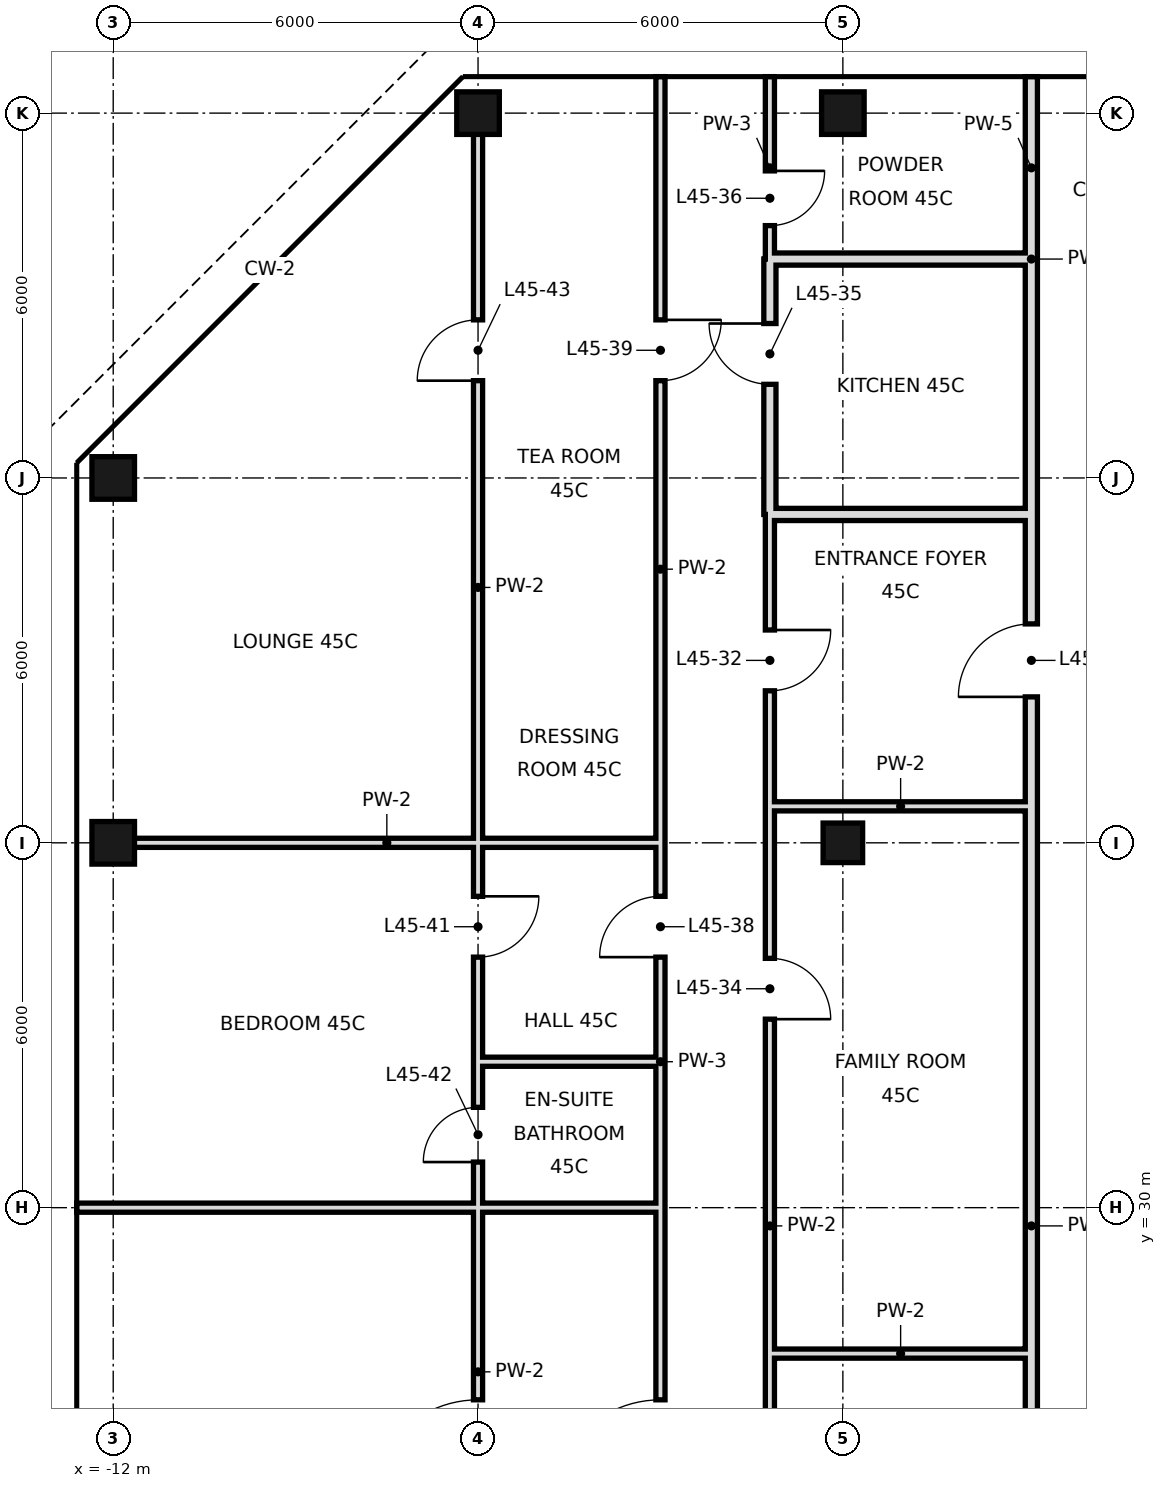
"""IFC4 building model, lengths in metres.
Left out: names, types, materials, properties, quantities, classifications, styles, units other than length and angle.
Written with IfcOpenShell. Run it as: python <this file> out.ifc"""

import sys

from ifc_helpers import new_model, si_unit, direction, frame, frame_2d, origin, origin_2d, place, context, subcontext, project, spatial, rectangle, hollow_rectangle, extrude, element, fill, save


model = new_model("IFC4")
c1 = context("Model", 3, precision=1e-05, world=origin(), true_north=direction((0.0, 1.0)))
c2 = subcontext(c1, "Body", "Model", "MODEL_VIEW")
j1 = project(units=[si_unit("LENGTHUNIT", "METRE"), si_unit("PLANEANGLEUNIT", "RADIAN")], contexts=[c1])
p1 = place(None, origin())
s1 = spatial("IfcSite", under=j1, at=p1, CompositionType="ELEMENT")
p2 = place(p1, origin())
s2 = spatial("IfcBuilding", under=s1, at=p2, CompositionType="ELEMENT")
p3 = place(p2, frame((0.0, 0.0, 195.6)))
s3 = spatial("IfcBuildingStorey", under=s2, at=p3, CompositionType="ELEMENT", Elevation=195.6)
for number, where, z_axis, x_axis in (
    (1, (-12.0, 36.0, 0.0), (0.0, 0.0, 1.0), (1.0, 0.0, 0.0)),
    (2, (-12.0, 42.0, 0.0), (0.0, 0.0, 1.0), (1.0, 0.0, 0.0)),
    (3, (-6.0, 48.0, 0.0), (0.0, 0.0, 1.0), (1.0, 0.0, 0.0)),
):
    element("IfcColumn", number, at=place(p3, frame(where, z_axis=z_axis, x_axis=x_axis)), inside=s3, PredefinedType="COLUMN", context=c2, shape_type="SweptSolid", body=[
        extrude(hollow_rectangle(XDim=0.7, YDim=0.7, WallThickness=0.036, at=origin_2d()), origin(), (0.0, 0.0, 1.0), 3.6),
    ])
p4 = place(p3, frame((0.0, 36.0, 0.0), z_axis=(0.0, 0.0, 1.0), x_axis=(1.0, 0.0, 0.0)))
e4 = element("IfcColumn", 4, at=p4, inside=s3, PredefinedType="COLUMN", context=c2, shape_type="SweptSolid", body=[
    extrude(hollow_rectangle(XDim=0.65, YDim=0.65, WallThickness=0.032, at=origin_2d()), origin(), (0.0, 0.0, 1.0), 3.6),
])
p5 = place(p3, frame((0.0, 48.0, 0.0), z_axis=(0.0, 0.0, 1.0), x_axis=(1.0, 0.0, 0.0)))
e5 = element("IfcColumn", 5, at=p5, inside=s3, PredefinedType="COLUMN", context=c2, shape_type="SweptSolid", body=[
    extrude(hollow_rectangle(XDim=0.7, YDim=0.7, WallThickness=0.036, at=origin_2d()), origin(), (0.0, 0.0, 1.0), 3.6),
])
p6 = place(p3, frame((-1.2, 41.4, 0.0), z_axis=(0.0, 0.0, 1.0), x_axis=(0.0, 1.0, 0.0)))
e6 = element("IfcWall", 6, at=p6, inside=s3, PredefinedType="SOLIDWALL", context=c2, shape_type="SweptSolid", body=[
    extrude(rectangle(XDim=4.2, YDim=0.2, at=frame_2d((2.1, 0.0))), origin(), (0.0, 0.0, 1.0), 2.72),
])
p7 = place(p6, frame((2.14, 0.0, 0.0)))
e7 = element("IfcOpeningElement", 7, at=p7, cuts=e6, PredefinedType="OPENING", context=c2, shape_type="SweptSolid", body=[
    extrude(rectangle(XDim=1.0, YDim=2.4, at=frame_2d((0.5, 1.2))), frame((0.0, 0.11, 0.0), z_axis=(0.0, -1.0, 0.0), x_axis=(1.0, 0.0, 0.0)), (0.0, 0.0, 1.0), 0.22),
])
p8 = place(p3, frame((-1.2, 18.0, 0.0), z_axis=(0.0, 0.0, 1.0), x_axis=(0.0, 1.0, 0.0)))
e8 = element("IfcWall", 8, at=p8, inside=s3, PredefinedType="PARTITIONING", context=c2, shape_type="SweptSolid", body=[
    extrude(rectangle(XDim=23.4, YDim=0.15, at=frame_2d((11.7, 0.0))), origin(), (0.0, 0.0, 1.0), 3.42),
])
p9 = place(p8, frame((20.5, 0.0, 0.0)))
e9 = element("IfcOpeningElement", 9, at=p9, cuts=e8, PredefinedType="OPENING", context=c2, shape_type="SweptSolid", body=[
    extrude(rectangle(XDim=1.0, YDim=2.4, at=frame_2d((0.5, 1.2))), frame((0.0, 0.085, 0.0), z_axis=(0.0, -1.0, 0.0), x_axis=(1.0, 0.0, 0.0)), (0.0, 0.0, 1.0), 0.17),
])
p10 = place(p8, frame((4.3, 0.0, 0.0)))
e10 = element("IfcOpeningElement", 10, at=p10, cuts=e8, PredefinedType="OPENING", context=c2, shape_type="SweptSolid", body=[
    extrude(rectangle(XDim=1.0, YDim=2.4, at=frame_2d((0.5, 1.2))), frame((0.0, 0.085, 0.0), z_axis=(0.0, -1.0, 0.0), x_axis=(1.0, 0.0, 0.0)), (0.0, 0.0, 1.0), 0.17),
])
p11 = place(p8, frame((15.1, 0.0, 0.0)))
e11 = element("IfcOpeningElement", 11, at=p11, cuts=e8, PredefinedType="OPENING", context=c2, shape_type="SweptSolid", body=[
    extrude(rectangle(XDim=1.0, YDim=2.4, at=frame_2d((0.5, 1.2))), frame((0.0, 0.085, 0.0), z_axis=(0.0, -1.0, 0.0), x_axis=(1.0, 0.0, 0.0)), (0.0, 0.0, 1.0), 0.17),
])
p12 = place(p3, frame((-1.2, 45.6, 0.0), z_axis=(0.0, 0.0, 1.0), x_axis=(0.0, 1.0, 0.0)))
e12 = element("IfcWall", 12, at=p12, inside=s3, PredefinedType="PARTITIONING", context=c2, shape_type="SweptSolid", body=[
    extrude(rectangle(XDim=3.0, YDim=0.15, at=frame_2d((1.5, 0.0))), origin(), (0.0, 0.0, 1.0), 3.42),
])
p13 = place(p12, frame((0.55, 0.0, 0.0)))
e13 = element("IfcOpeningElement", 13, at=p13, cuts=e12, PredefinedType="OPENING", context=c2, shape_type="SweptSolid", body=[
    extrude(rectangle(XDim=0.9, YDim=2.4, at=frame_2d((0.45, 1.2))), frame((0.0, 0.085, 0.0), z_axis=(0.0, -1.0, 0.0), x_axis=(1.0, 0.0, 0.0)), (0.0, 0.0, 1.0), 0.17),
])
p14 = place(p3, frame((-3.0, 18.0, 0.0), z_axis=(0.0, 0.0, 1.0), x_axis=(0.0, 1.0, 0.0)))
e14 = element("IfcWall", 14, at=p14, inside=s3, PredefinedType="PARTITIONING", context=c2, shape_type="SweptSolid", body=[
    extrude(rectangle(XDim=12.0, YDim=0.15, at=frame_2d((6.0, 0.0))), origin(), (0.0, 0.0, 1.0), 3.42),
])
p15 = place(p14, frame((7.04, 0.0, 0.0)))
e15 = element("IfcOpeningElement", 15, at=p15, cuts=e14, PredefinedType="OPENING", context=c2, shape_type="SweptSolid", body=[
    extrude(rectangle(XDim=1.8, YDim=2.4, at=frame_2d((0.9, 1.2))), frame((0.0, 0.085, 0.0), z_axis=(0.0, -1.0, 0.0), x_axis=(1.0, 0.0, 0.0)), (0.0, 0.0, 1.0), 0.17),
])
p16 = place(p3, frame((-3.0, 32.4, 0.0), z_axis=(0.0, 0.0, 1.0), x_axis=(0.0, 1.0, 0.0)))
e16 = element("IfcWall", 16, at=p16, inside=s3, PredefinedType="PARTITIONING", context=c2, shape_type="SweptSolid", body=[
    extrude(rectangle(XDim=16.2, YDim=0.15, at=frame_2d((8.1, 0.0))), origin(), (0.0, 0.0, 1.0), 3.42),
])
p17 = place(p16, frame((1.72, 0.0, 0.0)))
e17 = element("IfcOpeningElement", 17, at=p17, cuts=e16, PredefinedType="OPENING", context=c2, shape_type="SweptSolid", body=[
    extrude(rectangle(XDim=1.0, YDim=2.4, at=frame_2d((0.5, 1.2))), frame((0.0, 0.085, 0.0), z_axis=(0.0, -1.0, 0.0), x_axis=(1.0, 0.0, 0.0)), (0.0, 0.0, 1.0), 0.17),
])
p18 = place(p16, frame((11.2, 0.0, 0.0)))
e18 = element("IfcOpeningElement", 18, at=p18, cuts=e16, PredefinedType="OPENING", context=c2, shape_type="SweptSolid", body=[
    extrude(rectangle(XDim=1.0, YDim=2.4, at=frame_2d((0.5, 1.2))), frame((0.0, 0.085, 0.0), z_axis=(0.0, -1.0, 0.0), x_axis=(1.0, 0.0, 0.0)), (0.0, 0.0, 1.0), 0.17),
])
p19 = place(p3, frame((-3.0, 30.0, 0.0), z_axis=(0.0, 0.0, 1.0), x_axis=(0.0, 1.0, 0.0)))
e19 = element("IfcWall", 19, at=p19, inside=s3, PredefinedType="PARTITIONING", context=c2, shape_type="SweptSolid", body=[
    extrude(rectangle(XDim=2.4, YDim=0.15, at=frame_2d((1.2, 0.0))), origin(), (0.0, 0.0, 1.0), 3.42),
])
p20 = place(p3, frame((-6.0, 18.0, 0.0), z_axis=(0.0, 0.0, 1.0), x_axis=(0.0, 1.0, 0.0)))
e20 = element("IfcWall", 20, at=p20, inside=s3, PredefinedType="PARTITIONING", context=c2, shape_type="SweptSolid", body=[
    extrude(rectangle(XDim=12.0, YDim=0.15, at=frame_2d((6.0, 0.0))), origin(), (0.0, 0.0, 1.0), 3.42),
])
p21 = place(p20, frame((7.04, 0.0, 0.0)))
e21 = element("IfcOpeningElement", 21, at=p21, cuts=e20, PredefinedType="OPENING", context=c2, shape_type="SweptSolid", body=[
    extrude(rectangle(XDim=1.8, YDim=2.4, at=frame_2d((0.9, 1.2))), frame((0.0, 0.085, 0.0), z_axis=(0.0, -1.0, 0.0), x_axis=(1.0, 0.0, 0.0)), (0.0, 0.0, 1.0), 0.17),
])
p22 = place(p3, frame((-6.0, 32.4, 0.0), z_axis=(0.0, 0.0, 1.0), x_axis=(0.0, 1.0, 0.0)))
e22 = element("IfcWall", 22, at=p22, inside=s3, PredefinedType="PARTITIONING", context=c2, shape_type="SweptSolid", body=[
    extrude(rectangle(XDim=15.6, YDim=0.15, at=frame_2d((7.8, 0.0))), origin(), (0.0, 0.0, 1.0), 3.42),
])
p23 = place(p22, frame((1.72, 0.0, 0.0)))
e23 = element("IfcOpeningElement", 23, at=p23, cuts=e22, PredefinedType="OPENING", context=c2, shape_type="SweptSolid", body=[
    extrude(rectangle(XDim=1.0, YDim=2.4, at=frame_2d((0.5, 1.2))), frame((0.0, 0.085, 0.0), z_axis=(0.0, -1.0, 0.0), x_axis=(1.0, 0.0, 0.0)), (0.0, 0.0, 1.0), 0.17),
])
p24 = place(p22, frame((11.2, 0.0, 0.0)))
e24 = element("IfcOpeningElement", 24, at=p24, cuts=e22, PredefinedType="OPENING", context=c2, shape_type="SweptSolid", body=[
    extrude(rectangle(XDim=1.0, YDim=2.4, at=frame_2d((0.5, 1.2))), frame((0.0, 0.085, 0.0), z_axis=(0.0, -1.0, 0.0), x_axis=(1.0, 0.0, 0.0)), (0.0, 0.0, 1.0), 0.17),
])
p25 = place(p3, frame((-6.0, 30.0, 0.0), z_axis=(0.0, 0.0, 1.0), x_axis=(0.0, 1.0, 0.0)))
e25 = element("IfcWall", 25, at=p25, inside=s3, PredefinedType="PARTITIONING", context=c2, shape_type="SweptSolid", body=[
    extrude(rectangle(XDim=2.4, YDim=0.15, at=frame_2d((1.2, 0.0))), origin(), (0.0, 0.0, 1.0), 3.42),
])
p26 = place(p25, frame((0.75, 0.0, 0.0)))
e26 = element("IfcOpeningElement", 26, at=p26, cuts=e25, PredefinedType="OPENING", context=c2, shape_type="SweptSolid", body=[
    extrude(rectangle(XDim=0.9, YDim=2.4, at=frame_2d((0.45, 1.2))), frame((0.0, 0.085, 0.0), z_axis=(0.0, -1.0, 0.0), x_axis=(1.0, 0.0, 0.0)), (0.0, 0.0, 1.0), 0.17),
])
p27 = place(p3, frame((3.1, 18.0, 0.0), z_axis=(0.0, 0.0, 1.0), x_axis=(0.0, 1.0, 0.0)))
e27 = element("IfcWall", 27, at=p27, inside=s3, PredefinedType="SOLIDWALL", context=c2, shape_type="SweptSolid", body=[
    extrude(rectangle(XDim=23.4, YDim=0.2, at=frame_2d((11.7, 0.0))), origin(), (0.0, 0.0, 1.0), 2.97),
])
p28 = place(p27, frame((20.4, 0.0, 0.0)))
e28 = element("IfcOpeningElement", 28, at=p28, cuts=e27, PredefinedType="OPENING", context=c2, shape_type="SweptSolid", body=[
    extrude(rectangle(XDim=1.2, YDim=2.4, at=frame_2d((0.6, 1.2))), frame((0.0, 0.11, 0.0), z_axis=(0.0, -1.0, 0.0), x_axis=(1.0, 0.0, 0.0)), (0.0, 0.0, 1.0), 0.22),
])
p29 = place(p3, frame((3.1, 45.6, 0.0), z_axis=(0.0, 0.0, 1.0), x_axis=(0.0, 1.0, 0.0)))
e29 = element("IfcWall", 29, at=p29, inside=s3, PredefinedType="SOLIDWALL", context=c2, shape_type="SweptSolid", body=[
    extrude(rectangle(XDim=3.0, YDim=0.2, at=frame_2d((1.5, 0.0))), origin(), (0.0, 0.0, 1.0), 2.72),
])
p30 = place(p3, frame((3.1, 41.4, 0.0), z_axis=(0.0, 0.0, 1.0), x_axis=(0.0, 1.0, 0.0)))
e30 = element("IfcWall", 30, at=p30, inside=s3, PredefinedType="SOLIDWALL", context=c2, shape_type="SweptSolid", body=[
    extrude(rectangle(XDim=4.2, YDim=0.2, at=frame_2d((2.1, 0.0))), origin(), (0.0, 0.0, 1.0), 2.97),
])
p31 = place(p3, frame((-1.2, 27.6, 0.0), z_axis=(0.0, 0.0, 1.0), x_axis=(1.0, 0.0, 0.0)))
e31 = element("IfcWall", 31, at=p31, inside=s3, PredefinedType="PARTITIONING", context=c2, shape_type="SweptSolid", body=[
    extrude(rectangle(XDim=4.3, YDim=0.15, at=frame_2d((2.15, 0.0))), origin(), (0.0, 0.0, 1.0), 3.42),
])
p32 = place(p3, frame((-12.6, 30.0, 0.0), z_axis=(0.0, 0.0, 1.0), x_axis=(1.0, 0.0, 0.0)))
e32 = element("IfcWall", 32, at=p32, inside=s3, PredefinedType="PARTITIONING", context=c2, shape_type="SweptSolid", body=[
    extrude(rectangle(XDim=6.6, YDim=0.15, at=frame_2d((3.3, 0.0))), origin(), (0.0, 0.0, 1.0), 2.72),
])
p33 = place(p3, frame((-6.0, 30.0, 0.0), z_axis=(0.0, 0.0, 1.0), x_axis=(1.0, 0.0, 0.0)))
e33 = element("IfcWall", 33, at=p33, inside=s3, PredefinedType="PARTITIONING", context=c2, shape_type="SweptSolid", body=[
    extrude(rectangle(XDim=3.0, YDim=0.15, at=frame_2d((1.5, 0.0))), origin(), (0.0, 0.0, 1.0), 2.72),
])
p34 = place(p3, frame((-6.0, 32.4, 0.0), z_axis=(0.0, 0.0, 1.0), x_axis=(1.0, 0.0, 0.0)))
e34 = element("IfcWall", 34, at=p34, inside=s3, PredefinedType="PARTITIONING", context=c2, shape_type="SweptSolid", body=[
    extrude(rectangle(XDim=3.0, YDim=0.15, at=frame_2d((1.5, 0.0))), origin(), (0.0, 0.0, 1.0), 3.42),
])
p35 = place(p3, frame((-12.0, 36.0, 0.0), z_axis=(0.0, 0.0, 1.0), x_axis=(1.0, 0.0, 0.0)))
e35 = element("IfcWall", 35, at=p35, inside=s3, PredefinedType="PARTITIONING", context=c2, shape_type="SweptSolid", body=[
    extrude(rectangle(XDim=9.0, YDim=0.15, at=frame_2d((4.5, 0.0))), origin(), (0.0, 0.0, 1.0), 2.72),
])
p36 = place(p3, frame((-1.2, 36.6, 0.0), z_axis=(0.0, 0.0, 1.0), x_axis=(1.0, 0.0, 0.0)))
e36 = element("IfcWall", 36, at=p36, inside=s3, PredefinedType="PARTITIONING", context=c2, shape_type="SweptSolid", body=[
    extrude(rectangle(XDim=4.3, YDim=0.15, at=frame_2d((2.15, 0.0))), origin(), (0.0, 0.0, 1.0), 3.42),
])
for number, where, z_axis, x_axis in (
    (37, (-1.2, 41.4, 0.0), (0.0, 0.0, 1.0), (1.0, 0.0, 0.0)),
    (38, (-1.2, 45.6, 0.0), (0.0, 0.0, 1.0), (1.0, 0.0, 0.0)),
):
    element("IfcWall", number, at=place(p3, frame(where, z_axis=z_axis, x_axis=x_axis)), inside=s3, PredefinedType="SOLIDWALL", context=c2, shape_type="SweptSolid", body=[
        extrude(rectangle(XDim=4.3, YDim=0.2, at=frame_2d((2.15, 0.0))), origin(), (0.0, 0.0, 1.0), 2.72),
    ])
p37 = place(p9, origin())
e39 = element("IfcDoor", 39, at=p37, inside=s3, OperationType="SINGLE_SWING_RIGHT", PredefinedType="DOOR", context=c2, shape_type="SweptSolid", body=[
    extrude(rectangle(XDim=1.0, YDim=2.4, at=frame_2d((0.5, 1.2))), frame((0.0, 0.025, 0.0), z_axis=(0.0, -1.0, 0.0), x_axis=(1.0, 0.0, 0.0)), (0.0, 0.0, 1.0), 0.05),
])
fill(e9, e39)
p38 = place(p11, frame((1.0, 0.0, 0.0), z_axis=(0.0, 0.0, 1.0), x_axis=(-1.0, 0.0, 0.0)))
e40 = element("IfcDoor", 40, at=p38, inside=s3, OperationType="SINGLE_SWING_RIGHT", PredefinedType="DOOR", context=c2, shape_type="SweptSolid", body=[
    extrude(rectangle(XDim=1.0, YDim=2.4, at=frame_2d((0.5, 1.2))), frame((0.0, 0.025, 0.0), z_axis=(0.0, -1.0, 0.0), x_axis=(1.0, 0.0, 0.0)), (0.0, 0.0, 1.0), 0.05),
])
fill(e11, e40)
p39 = place(p7, frame((1.0, 0.0, 0.0), z_axis=(0.0, 0.0, 1.0), x_axis=(-1.0, 0.0, 0.0)))
e41 = element("IfcDoor", 41, at=p39, inside=s3, OperationType="SINGLE_SWING_LEFT", PredefinedType="DOOR", context=c2, shape_type="SweptSolid", body=[
    extrude(rectangle(XDim=1.0, YDim=2.4, at=frame_2d((0.5, 1.2))), frame((0.0, 0.025, 0.0), z_axis=(0.0, -1.0, 0.0), x_axis=(1.0, 0.0, 0.0)), (0.0, 0.0, 1.0), 0.05),
])
fill(e7, e41)
p40 = place(p13, origin())
e42 = element("IfcDoor", 42, at=p40, inside=s3, OperationType="SINGLE_SWING_RIGHT", PredefinedType="DOOR", context=c2, shape_type="SweptSolid", body=[
    extrude(rectangle(XDim=0.9, YDim=2.4, at=frame_2d((0.45, 1.2))), frame((0.0, 0.025, 0.0), z_axis=(0.0, -1.0, 0.0), x_axis=(1.0, 0.0, 0.0)), (0.0, 0.0, 1.0), 0.05),
])
fill(e13, e42)
p41 = place(p15, origin())
e43 = element("IfcDoor", 43, at=p41, inside=s3, OperationType="SINGLE_SWING_LEFT", PredefinedType="DOOR", context=c2, shape_type="SweptSolid", body=[
    extrude(rectangle(XDim=1.8, YDim=2.4, at=frame_2d((0.9, 1.2))), frame((0.0, 0.025, 0.0), z_axis=(0.0, -1.0, 0.0), x_axis=(1.0, 0.0, 0.0)), (0.0, 0.0, 1.0), 0.05),
])
fill(e15, e43)
p42 = place(p17, origin())
e44 = element("IfcDoor", 44, at=p42, inside=s3, OperationType="SINGLE_SWING_LEFT", PredefinedType="DOOR", context=c2, shape_type="SweptSolid", body=[
    extrude(rectangle(XDim=1.0, YDim=2.4, at=frame_2d((0.5, 1.2))), frame((0.0, 0.025, 0.0), z_axis=(0.0, -1.0, 0.0), x_axis=(1.0, 0.0, 0.0)), (0.0, 0.0, 1.0), 0.05),
])
fill(e17, e44)
p43 = place(p18, origin())
e45 = element("IfcDoor", 45, at=p43, inside=s3, OperationType="SINGLE_SWING_RIGHT", PredefinedType="DOOR", context=c2, shape_type="SweptSolid", body=[
    extrude(rectangle(XDim=1.0, YDim=2.4, at=frame_2d((0.5, 1.2))), frame((0.0, 0.025, 0.0), z_axis=(0.0, -1.0, 0.0), x_axis=(1.0, 0.0, 0.0)), (0.0, 0.0, 1.0), 0.05),
])
fill(e18, e45)
p44 = place(p21, origin())
e46 = element("IfcDoor", 46, at=p44, inside=s3, OperationType="SINGLE_SWING_LEFT", PredefinedType="DOOR", context=c2, shape_type="SweptSolid", body=[
    extrude(rectangle(XDim=1.8, YDim=2.4, at=frame_2d((0.9, 1.2))), frame((0.0, 0.025, 0.0), z_axis=(0.0, -1.0, 0.0), x_axis=(1.0, 0.0, 0.0)), (0.0, 0.0, 1.0), 0.05),
])
fill(e21, e46)
p45 = place(p23, origin())
e47 = element("IfcDoor", 47, at=p45, inside=s3, OperationType="SINGLE_SWING_RIGHT", PredefinedType="DOOR", context=c2, shape_type="SweptSolid", body=[
    extrude(rectangle(XDim=1.0, YDim=2.4, at=frame_2d((0.5, 1.2))), frame((0.0, 0.025, 0.0), z_axis=(0.0, -1.0, 0.0), x_axis=(1.0, 0.0, 0.0)), (0.0, 0.0, 1.0), 0.05),
])
fill(e23, e47)
p46 = place(p26, origin())
e48 = element("IfcDoor", 48, at=p46, inside=s3, OperationType="SINGLE_SWING_LEFT", PredefinedType="DOOR", context=c2, shape_type="SweptSolid", body=[
    extrude(rectangle(XDim=0.9, YDim=2.4, at=frame_2d((0.45, 1.2))), frame((0.0, 0.025, 0.0), z_axis=(0.0, -1.0, 0.0), x_axis=(1.0, 0.0, 0.0)), (0.0, 0.0, 1.0), 0.05),
])
fill(e26, e48)
p47 = place(p24, origin())
e49 = element("IfcDoor", 49, at=p47, inside=s3, OperationType="SINGLE_SWING_LEFT", PredefinedType="DOOR", context=c2, shape_type="SweptSolid", body=[
    extrude(rectangle(XDim=1.0, YDim=2.4, at=frame_2d((0.5, 1.2))), frame((0.0, 0.025, 0.0), z_axis=(0.0, -1.0, 0.0), x_axis=(1.0, 0.0, 0.0)), (0.0, 0.0, 1.0), 0.05),
])
fill(e24, e49)
p48 = place(p28, origin())
e50 = element("IfcDoor", 50, at=p48, inside=s3, OperationType="SINGLE_SWING_LEFT", PredefinedType="DOOR", context=c2, shape_type="SweptSolid", body=[
    extrude(rectangle(XDim=1.2, YDim=2.4, at=frame_2d((0.6, 1.2))), frame((0.0, 0.025, 0.0), z_axis=(0.0, -1.0, 0.0), x_axis=(1.0, 0.0, 0.0)), (0.0, 0.0, 1.0), 0.05),
])
fill(e28, e50)
save(model, sys.argv[1])
